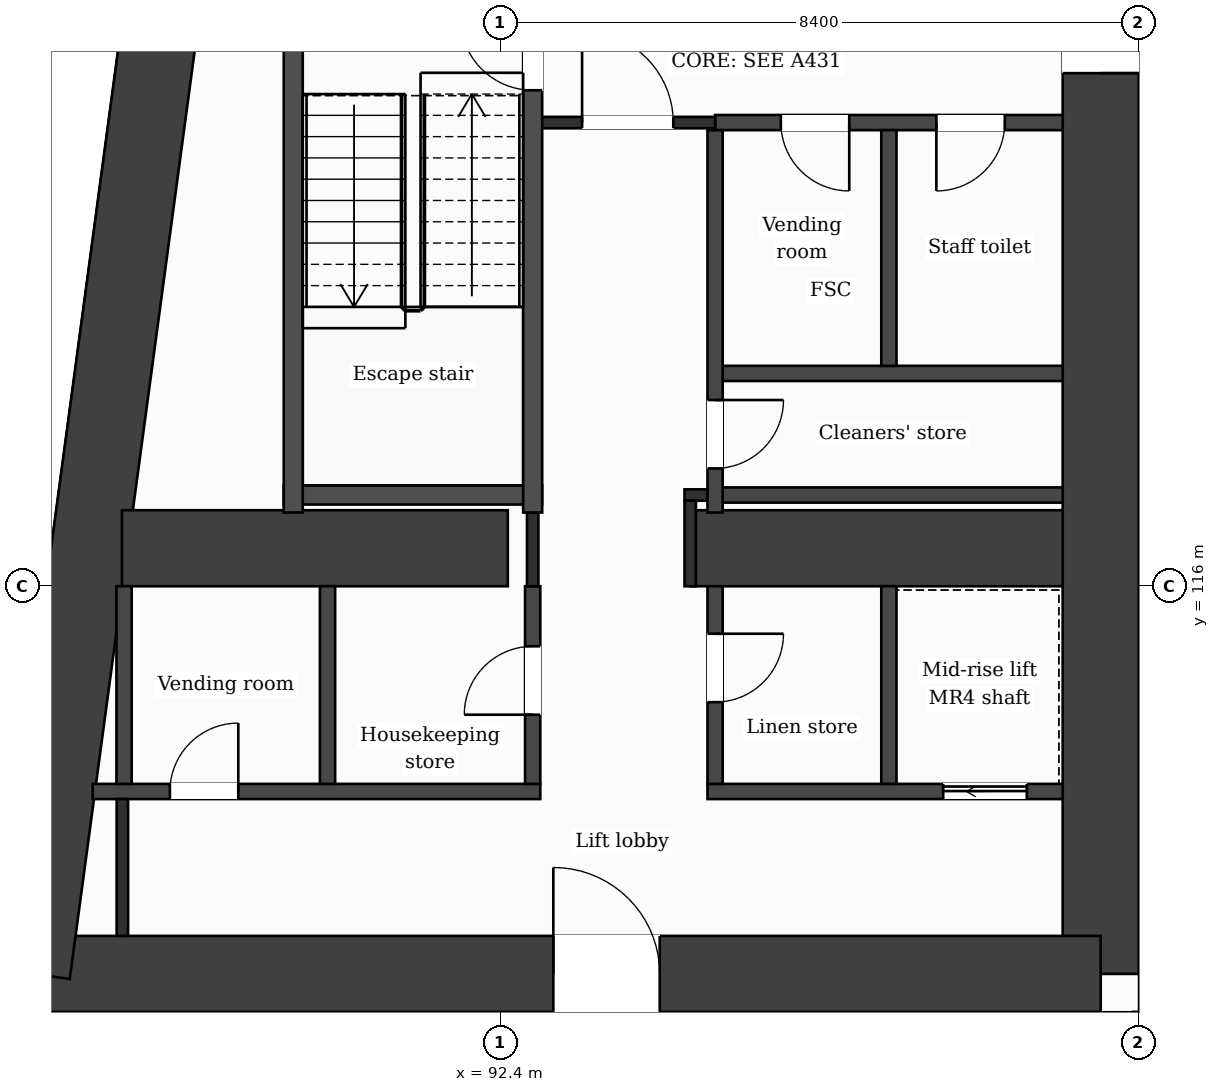
"""IFC4 building model, lengths in metres.
Left out: names, types, materials, properties, quantities, classifications, styles, units other than length and angle.
Written with IfcOpenShell. Run it as: python <this file> out.ifc"""

import sys

from ifc_helpers import new_model, si_unit, direction, frame, frame_2d, origin, place, context, subcontext, project, spatial, rectangle, extrude, element, fill, save


model = new_model("IFC4")
c1 = context("Model", 3, precision=1e-05, world=origin(), true_north=direction((0.0, 1.0)))
c2 = subcontext(c1, "Body", "Model", "MODEL_VIEW")
j1 = project(units=[si_unit("LENGTHUNIT", "METRE"), si_unit("PLANEANGLEUNIT", "RADIAN")], contexts=[c1])
p1 = place(None, origin())
s1 = spatial("IfcSite", under=j1, at=p1, CompositionType="ELEMENT")
p2 = place(p1, origin())
s2 = spatial("IfcBuilding", under=s1, at=p2, CompositionType="ELEMENT")
p3 = place(p2, frame((0.0, 0.0, 128.0)))
s3 = spatial("IfcBuildingStorey", under=s2, at=p3, CompositionType="ELEMENT", Elevation=128.0)
p4 = place(p3, frame((100.3, 131.9, 0.0), z_axis=(0.0, 0.0, 1.0), x_axis=(0.0, -1.0, 0.0)))
e1 = element("IfcWall", 1, at=p4, inside=s3, PredefinedType="SHEAR", context=c2, shape_type="SweptSolid", body=[
    extrude(rectangle(XDim=21.0, YDim=1.0, at=frame_2d((10.5, 0.0))), origin(), (0.0, 0.0, 1.0), 3.7),
])
p5 = place(p4, frame((7.75, 0.0, 0.0)))
e2 = element("IfcOpeningElement", 2, at=p5, cuts=e1, PredefinedType="OPENING", context=c2, shape_type="SweptSolid", body=[
    extrude(rectangle(XDim=1.4, YDim=2.1, at=frame_2d((0.7, 1.05))), frame((0.0, 0.51, 0.0), z_axis=(0.0, -1.0, 0.0), x_axis=(1.0, 0.0, 0.0)), (0.0, 0.0, 1.0), 1.02),
])
p6 = place(p3, frame((100.3, 110.9, 0.0), z_axis=(0.0, 0.0, 1.0), x_axis=(-1.0, 0.0, 0.0)))
e3 = element("IfcWall", 3, at=p6, inside=s3, PredefinedType="SHEAR", context=c2, shape_type="SweptSolid", body=[
    extrude(rectangle(XDim=14.059, YDim=1.0, at=frame_2d((7.03, 0.0))), origin(), (0.0, 0.0, 1.0), 3.7),
])
p7 = place(p6, frame((5.802, 0.0, 0.0)))
e4 = element("IfcOpeningElement", 4, at=p7, cuts=e3, PredefinedType="OPENING", context=c2, shape_type="SweptSolid", body=[
    extrude(rectangle(XDim=1.4, YDim=2.1, at=frame_2d((0.7, 1.05))), frame((0.0, 0.51, 0.0), z_axis=(0.0, -1.0, 0.0), x_axis=(1.0, 0.0, 0.0)), (0.0, 0.0, 1.0), 1.02),
])
p8 = place(p3, frame((86.241, 110.9, 0.0), z_axis=(0.0, 0.0, 1.0), x_axis=(0.133411141623, 0.991060778808, 0.0)))
e5 = element("IfcWall", 5, at=p8, inside=s3, PredefinedType="SHEAR", context=c2, shape_type="SweptSolid", body=[
    extrude(rectangle(XDim=21.189, YDim=1.0, at=frame_2d((10.595, 0.0))), origin(), (0.0, 0.0, 1.0), 3.7),
])
p9 = place(p3, frame((87.423, 116.5, 0.0), z_axis=(0.0, 0.0, 1.0), x_axis=(1.0, 0.0, 0.0)))
e6 = element("IfcWall", 6, at=p9, inside=s3, PredefinedType="SHEAR", context=c2, shape_type="SweptSolid", body=[
    extrude(rectangle(XDim=5.077, YDim=1.0, at=frame_2d((2.539, 0.0))), origin(), (0.0, 0.0, 1.0), 3.7),
])
p10 = place(p3, frame((94.9, 116.5, 0.0), z_axis=(0.0, 0.0, 1.0), x_axis=(1.0, 0.0, 0.0)))
e7 = element("IfcWall", 7, at=p10, inside=s3, PredefinedType="SHEAR", context=c2, shape_type="SweptSolid", body=[
    extrude(rectangle(XDim=4.9, YDim=1.0, at=frame_2d((2.45, 0.0))), origin(), (0.0, 0.0, 1.0), 3.7),
])
p11 = place(p3, frame((87.334, 110.4, 0.0), z_axis=(0.0, 0.0, 1.0), x_axis=(-0.133437175554, -0.991057273915, 0.0)))
e8 = element("IfcWall", 8, at=p11, inside=s3, PredefinedType="SOLIDWALL", context=c2, shape_type="SweptSolid", body=[
    extrude(rectangle(XDim=6.781, YDim=0.3, at=frame_2d((3.39, 0.0))), origin(), (0.0, 0.0, 1.0), 3.38),
])
p12 = place(p11, frame((1.418, 0.0, 0.0)))
e9 = element("IfcOpeningElement", 9, at=p12, cuts=e8, PredefinedType="OPENING", context=c2, shape_type="SweptSolid", body=[
    extrude(rectangle(XDim=1.2, YDim=2.4, at=frame_2d((0.6, 1.2))), frame((0.0, 0.16, 0.0), z_axis=(0.0, -1.0, 0.0), x_axis=(1.0, 0.0, 0.0)), (0.0, 0.0, 1.0), 0.32),
])
p13 = place(p11, frame((4.758, 0.0, 0.9)))
e10 = element("IfcOpeningElement", 10, at=p13, cuts=e8, PredefinedType="OPENING", context=c2, shape_type="SweptSolid", body=[
    extrude(rectangle(XDim=1.2, YDim=2.1, at=frame_2d((0.6, 1.05))), frame((0.0, 0.16, 0.0), z_axis=(0.0, -1.0, 0.0), x_axis=(1.0, 0.0, 0.0)), (0.0, 0.0, 1.0), 0.32),
])
p14 = place(p3, frame((87.039, 113.3, 0.0), z_axis=(0.0, 0.0, 1.0), x_axis=(1.0, 0.0, 0.0)))
e11 = element("IfcWall", 11, at=p14, inside=s3, PredefinedType="PARTITIONING", context=c2, shape_type="SweptSolid", body=[
    extrude(rectangle(XDim=5.888, YDim=0.2, at=frame_2d((2.944, 0.0))), origin(), (0.0, 0.0, 1.0), 3.38),
])
p15 = place(p14, frame((1.015, 0.0, 0.0)))
e12 = element("IfcOpeningElement", 12, at=p15, cuts=e11, PredefinedType="OPENING", context=c2, shape_type="SweptSolid", body=[
    extrude(rectangle(XDim=0.9, YDim=2.1, at=frame_2d((0.45, 1.05))), frame((0.0, 0.11, 0.0), z_axis=(0.0, -1.0, 0.0), x_axis=(1.0, 0.0, 0.0)), (0.0, 0.0, 1.0), 0.22),
])
p16 = place(p3, frame((95.127, 113.3, 0.0), z_axis=(0.0, 0.0, 1.0), x_axis=(1.0, 0.0, 0.0)))
e13 = element("IfcWall", 13, at=p16, inside=s3, PredefinedType="PARTITIONING", context=c2, shape_type="SweptSolid", body=[
    extrude(rectangle(XDim=4.673, YDim=0.2, at=frame_2d((2.336, 0.0))), origin(), (0.0, 0.0, 1.0), 3.38),
])
p17 = place(p16, frame((3.101, 0.0, 0.0)))
e14 = element("IfcOpeningElement", 14, at=p17, cuts=e13, PredefinedType="OPENING", context=c2, shape_type="SweptSolid", body=[
    extrude(rectangle(XDim=1.1, YDim=2.1, at=frame_2d((0.55, 1.05))), frame((0.0, 0.11, 0.0), z_axis=(0.0, -1.0, 0.0), x_axis=(1.0, 0.0, 0.0)), (0.0, 0.0, 1.0), 0.22),
])
p18 = place(p3, frame((95.227, 117.2, 0.0), z_axis=(0.0, 0.0, 1.0), x_axis=(1.0, 0.0, 0.0)))
e15 = element("IfcWall", 15, at=p18, inside=s3, PredefinedType="PARTITIONING", context=c2, shape_type="SweptSolid", body=[
    extrude(rectangle(XDim=4.573, YDim=0.2, at=frame_2d((2.287, 0.0))), origin(), (0.0, 0.0, 1.0), 3.38),
])
p19 = place(p3, frame((94.825, 117.2, 0.0), z_axis=(0.0, 0.0, 1.0), x_axis=(1.0, 0.0, 0.0)))
e16 = element("IfcWall", 16, at=p19, inside=s3, PredefinedType="PARTITIONING", context=c2, shape_type="SweptSolid", body=[
    extrude(rectangle(XDim=0.402, YDim=0.15, at=frame_2d((0.201, 0.0))), origin(), (0.0, 0.0, 1.0), 3.38),
])
p20 = place(p3, frame((89.552, 117.2, 0.0), z_axis=(0.0, 0.0, 1.0), x_axis=(1.0, 0.0, 0.0)))
e17 = element("IfcWall", 17, at=p20, inside=s3, PredefinedType="PARTITIONING", context=c2, shape_type="SweptSolid", body=[
    extrude(rectangle(XDim=3.4, YDim=0.25, at=frame_2d((1.7, 0.0))), origin(), (0.0, 0.0, 1.0), 3.38),
])
p21 = place(p3, frame((95.227, 118.8, 0.0), z_axis=(0.0, 0.0, 1.0), x_axis=(1.0, 0.0, 0.0)))
e18 = element("IfcWall", 18, at=p21, inside=s3, PredefinedType="PARTITIONING", context=c2, shape_type="SweptSolid", body=[
    extrude(rectangle(XDim=4.573, YDim=0.2, at=frame_2d((2.287, 0.0))), origin(), (0.0, 0.0, 1.0), 3.38),
])
p22 = place(p3, frame((95.227, 122.1, 0.0), z_axis=(0.0, 0.0, 1.0), x_axis=(1.0, 0.0, 0.0)))
e19 = element("IfcWall", 19, at=p22, inside=s3, PredefinedType="PARTITIONING", context=c2, shape_type="SweptSolid", body=[
    extrude(rectangle(XDim=4.573, YDim=0.2, at=frame_2d((2.287, 0.0))), origin(), (0.0, 0.0, 1.0), 3.38),
])
p23 = place(p22, frame((0.865, 0.0, 0.0)))
e20 = element("IfcOpeningElement", 20, at=p23, cuts=e19, PredefinedType="OPENING", context=c2, shape_type="SweptSolid", body=[
    extrude(rectangle(XDim=0.9, YDim=2.1, at=frame_2d((0.45, 1.05))), frame((0.0, 0.11, 0.0), z_axis=(0.0, -1.0, 0.0), x_axis=(1.0, 0.0, 0.0)), (0.0, 0.0, 1.0), 0.22),
])
p24 = place(p22, frame((2.911, 0.0, 0.0)))
e21 = element("IfcOpeningElement", 21, at=p24, cuts=e19, PredefinedType="OPENING", context=c2, shape_type="SweptSolid", body=[
    extrude(rectangle(XDim=0.9, YDim=2.1, at=frame_2d((0.45, 1.05))), frame((0.0, 0.11, 0.0), z_axis=(0.0, -1.0, 0.0), x_axis=(1.0, 0.0, 0.0)), (0.0, 0.0, 1.0), 0.22),
])
p25 = place(p3, frame((92.827, 122.1, 0.0), z_axis=(0.0, 0.0, 1.0), x_axis=(1.0, 0.0, 0.0)))
e22 = element("IfcWall", 22, at=p25, inside=s3, PredefinedType="PARTITIONING", context=c2, shape_type="SweptSolid", body=[
    extrude(rectangle(XDim=2.4, YDim=0.15, at=frame_2d((1.2, 0.0))), origin(), (0.0, 0.0, 1.0), 3.38),
])
p26 = place(p25, frame((0.65, 0.0, 0.0)))
e23 = element("IfcOpeningElement", 23, at=p26, cuts=e22, PredefinedType="OPENING", context=c2, shape_type="SweptSolid", body=[
    extrude(rectangle(XDim=1.2, YDim=2.1, at=frame_2d((0.6, 1.05))), frame((0.0, 0.085, 0.0), z_axis=(0.0, -1.0, 0.0), x_axis=(1.0, 0.0, 0.0)), (0.0, 0.0, 1.0), 0.17),
])
p27 = place(p3, frame((87.451, 113.4, 0.0), z_axis=(0.0, 0.0, 1.0), x_axis=(0.0, 1.0, 0.0)))
e24 = element("IfcWall", 24, at=p27, inside=s3, PredefinedType="PARTITIONING", context=c2, shape_type="SweptSolid", body=[
    extrude(rectangle(XDim=2.6, YDim=0.2, at=frame_2d((1.3, 0.0))), origin(), (0.0, 0.0, 1.0), 3.38),
])
p28 = place(p3, frame((87.429, 111.4, 0.0), z_axis=(0.0, 0.0, 1.0), x_axis=(0.0, 1.0, 0.0)))
e25 = element("IfcWall", 25, at=p28, inside=s3, PredefinedType="PARTITIONING", context=c2, shape_type="SweptSolid", body=[
    extrude(rectangle(XDim=1.8, YDim=0.15, at=frame_2d((0.9, 0.0))), origin(), (0.0, 0.0, 1.0), 3.38),
])
p29 = place(p3, frame((89.677, 116.97, 0.0), z_axis=(0.0, 0.0, 1.0), x_axis=(0.0, 1.0, 0.0)))
e26 = element("IfcWall", 26, at=p29, inside=s3, PredefinedType="PARTITIONING", context=c2, shape_type="SweptSolid", body=[
    extrude(rectangle(XDim=6.855, YDim=0.25, at=frame_2d((3.427, 0.0))), origin(), (0.0, 0.0, 1.0), 3.38),
])
p30 = place(p3, frame((90.128, 113.4, 0.0), z_axis=(0.0, 0.0, 1.0), x_axis=(0.0, 1.0, 0.0)))
e27 = element("IfcWall", 27, at=p30, inside=s3, PredefinedType="PARTITIONING", context=c2, shape_type="SweptSolid", body=[
    extrude(rectangle(XDim=2.6, YDim=0.2, at=frame_2d((1.3, 0.0))), origin(), (0.0, 0.0, 1.0), 3.38),
])
p31 = place(p3, frame((92.827, 113.4, 0.0), z_axis=(0.0, 0.0, 1.0), x_axis=(0.0, 1.0, 0.0)))
e28 = element("IfcWall", 28, at=p31, inside=s3, PredefinedType="PARTITIONING", context=c2, shape_type="SweptSolid", body=[
    extrude(rectangle(XDim=2.6, YDim=0.2, at=frame_2d((1.3, 0.0))), origin(), (0.0, 0.0, 1.0), 3.38),
])
p32 = place(p31, frame((0.91, 0.0, 0.0)))
e29 = element("IfcOpeningElement", 29, at=p32, cuts=e28, PredefinedType="OPENING", context=c2, shape_type="SweptSolid", body=[
    extrude(rectangle(XDim=0.9, YDim=2.1, at=frame_2d((0.45, 1.05))), frame((0.0, 0.11, 0.0), z_axis=(0.0, -1.0, 0.0), x_axis=(1.0, 0.0, 0.0)), (0.0, 0.0, 1.0), 0.22),
])
p33 = place(p3, frame((92.827, 116.0, 0.0), z_axis=(0.0, 0.0, 1.0), x_axis=(0.0, 1.0, 0.0)))
e30 = element("IfcWall", 30, at=p33, inside=s3, PredefinedType="PARTITIONING", context=c2, shape_type="SweptSolid", body=[
    extrude(rectangle(XDim=0.97, YDim=0.15, at=frame_2d((0.485, 0.0))), origin(), (0.0, 0.0, 1.0), 3.38),
])
p34 = place(p3, frame((92.827, 116.97, 0.0), z_axis=(0.0, 0.0, 1.0), x_axis=(0.0, 1.0, 0.0)))
e31 = element("IfcWall", 31, at=p34, inside=s3, PredefinedType="PARTITIONING", context=c2, shape_type="SweptSolid", body=[
    extrude(rectangle(XDim=6.855, YDim=0.25, at=frame_2d((3.427, 0.0))), origin(), (0.0, 0.0, 1.0), 3.38),
])
p35 = place(p34, frame((5.555, 0.0, 0.0)))
e32 = element("IfcOpeningElement", 32, at=p35, cuts=e31, PredefinedType="OPENING", context=c2, shape_type="SweptSolid", body=[
    extrude(rectangle(XDim=0.95, YDim=2.1, at=frame_2d((0.475, 1.05))), frame((0.0, 0.135, 0.0), z_axis=(0.0, -1.0, 0.0), x_axis=(1.0, 0.0, 0.0)), (0.0, 0.0, 1.0), 0.27),
])
p36 = place(p3, frame((94.9, 116.0, 0.0), z_axis=(0.0, 0.0, 1.0), x_axis=(0.0, 1.0, 0.0)))
e33 = element("IfcWall", 33, at=p36, inside=s3, PredefinedType="PARTITIONING", context=c2, shape_type="SweptSolid", body=[
    extrude(rectangle(XDim=1.125, YDim=0.15, at=frame_2d((0.562, 0.0))), origin(), (0.0, 0.0, 1.0), 3.38),
])
p37 = place(p3, frame((95.227, 113.4, 0.0), z_axis=(0.0, 0.0, 1.0), x_axis=(0.0, 1.0, 0.0)))
e34 = element("IfcWall", 34, at=p37, inside=s3, PredefinedType="PARTITIONING", context=c2, shape_type="SweptSolid", body=[
    extrude(rectangle(XDim=2.6, YDim=0.2, at=frame_2d((1.3, 0.0))), origin(), (0.0, 0.0, 1.0), 3.38),
])
p38 = place(p37, frame((1.075, 0.0, 0.0)))
e35 = element("IfcOpeningElement", 35, at=p38, cuts=e34, PredefinedType="OPENING", context=c2, shape_type="SweptSolid", body=[
    extrude(rectangle(XDim=0.9, YDim=2.1, at=frame_2d((0.45, 1.05))), frame((0.0, 0.11, 0.0), z_axis=(0.0, -1.0, 0.0), x_axis=(1.0, 0.0, 0.0)), (0.0, 0.0, 1.0), 0.22),
])
p39 = place(p3, frame((95.227, 116.97, 0.0), z_axis=(0.0, 0.0, 1.0), x_axis=(0.0, 1.0, 0.0)))
e36 = element("IfcWall", 36, at=p39, inside=s3, PredefinedType="PARTITIONING", context=c2, shape_type="SweptSolid", body=[
    extrude(rectangle(XDim=5.03, YDim=0.2, at=frame_2d((2.515, 0.0))), origin(), (0.0, 0.0, 1.0), 3.38),
])
p40 = place(p39, frame((0.58, 0.0, 0.0)))
e37 = element("IfcOpeningElement", 37, at=p40, cuts=e36, PredefinedType="OPENING", context=c2, shape_type="SweptSolid", body=[
    extrude(rectangle(XDim=0.9, YDim=2.1, at=frame_2d((0.45, 1.05))), frame((0.0, 0.11, 0.0), z_axis=(0.0, -1.0, 0.0), x_axis=(1.0, 0.0, 0.0)), (0.0, 0.0, 1.0), 0.22),
])
p41 = place(p3, frame((97.513, 113.4, 0.0), z_axis=(0.0, 0.0, 1.0), x_axis=(0.0, 1.0, 0.0)))
e38 = element("IfcWall", 38, at=p41, inside=s3, PredefinedType="PARTITIONING", context=c2, shape_type="SweptSolid", body=[
    extrude(rectangle(XDim=2.6, YDim=0.2, at=frame_2d((1.3, 0.0))), origin(), (0.0, 0.0, 1.0), 3.38),
])
p42 = place(p3, frame((97.513, 118.9, 0.0), z_axis=(0.0, 0.0, 1.0), x_axis=(0.0, 1.0, 0.0)))
e39 = element("IfcWall", 39, at=p42, inside=s3, PredefinedType="PARTITIONING", context=c2, shape_type="SweptSolid", body=[
    extrude(rectangle(XDim=3.1, YDim=0.2, at=frame_2d((1.55, 0.0))), origin(), (0.0, 0.0, 1.0), 3.38),
])
p43 = place(p3, frame((100.8, 109.075, 0.0), z_axis=(0.0, 0.0, 1.0), x_axis=(0.0, 1.0, 0.0)))
e40 = element("IfcWall", 40, at=p43, inside=s3, PredefinedType="PARTITIONING", context=c2, shape_type="SweptSolid", body=[
    extrude(rectangle(XDim=1.325, YDim=0.15, at=frame_2d((0.663, 0.0))), origin(), (0.0, 0.0, 1.0), 3.38),
])
p44 = place(p26, origin())
e41 = element("IfcDoor", 41, at=p44, inside=s3, OperationType="SINGLE_SWING_LEFT", PredefinedType="DOOR", context=c2, shape_type="SweptSolid", body=[
    extrude(rectangle(XDim=1.2, YDim=2.1, at=frame_2d((0.6, 1.05))), frame((0.0, 0.025, 0.0), z_axis=(0.0, -1.0, 0.0), x_axis=(1.0, 0.0, 0.0)), (0.0, 0.0, 1.0), 0.05),
])
fill(e23, e41)
p45 = place(p23, origin())
e42 = element("IfcDoor", 42, at=p45, inside=s3, OperationType="SINGLE_SWING_RIGHT", PredefinedType="DOOR", context=c2, shape_type="SweptSolid", body=[
    extrude(rectangle(XDim=0.9, YDim=2.1, at=frame_2d((0.45, 1.05))), frame((0.0, 0.025, 0.0), z_axis=(0.0, -1.0, 0.0), x_axis=(1.0, 0.0, 0.0)), (0.0, 0.0, 1.0), 0.05),
])
fill(e20, e42)
p46 = place(p24, origin())
e43 = element("IfcDoor", 43, at=p46, inside=s3, OperationType="SINGLE_SWING_LEFT", PredefinedType="DOOR", context=c2, shape_type="SweptSolid", body=[
    extrude(rectangle(XDim=0.9, YDim=2.1, at=frame_2d((0.45, 1.05))), frame((0.0, 0.025, 0.0), z_axis=(0.0, -1.0, 0.0), x_axis=(1.0, 0.0, 0.0)), (0.0, 0.0, 1.0), 0.05),
])
fill(e21, e43)
p47 = place(p35, origin())
e44 = element("IfcDoor", 44, at=p47, inside=s3, OperationType="SINGLE_SWING_RIGHT", PredefinedType="DOOR", context=c2, shape_type="SweptSolid", body=[
    extrude(rectangle(XDim=0.95, YDim=2.1, at=frame_2d((0.475, 1.05))), frame((0.0, 0.025, 0.0), z_axis=(0.0, -1.0, 0.0), x_axis=(1.0, 0.0, 0.0)), (0.0, 0.0, 1.0), 0.05),
])
fill(e32, e44)
p48 = place(p40, origin())
e45 = element("IfcDoor", 45, at=p48, inside=s3, OperationType="SINGLE_SWING_RIGHT", PredefinedType="DOOR", context=c2, shape_type="SweptSolid", body=[
    extrude(rectangle(XDim=0.9, YDim=2.1, at=frame_2d((0.45, 1.05))), frame((0.0, 0.025, 0.0), z_axis=(0.0, -1.0, 0.0), x_axis=(1.0, 0.0, 0.0)), (0.0, 0.0, 1.0), 0.05),
])
fill(e37, e45)
p49 = place(p17, origin())
e46 = element("IfcDoor", 46, at=p49, inside=s3, OperationType="SLIDING_TO_LEFT", PredefinedType="DOOR", context=c2, shape_type="SweptSolid", body=[
    extrude(rectangle(XDim=1.1, YDim=2.1, at=frame_2d((0.55, 1.05))), frame((0.0, 0.025, 0.0), z_axis=(0.0, -1.0, 0.0), x_axis=(1.0, 0.0, 0.0)), (0.0, 0.0, 1.0), 0.05),
])
fill(e14, e46)
p50 = place(p15, origin())
e47 = element("IfcDoor", 47, at=p50, inside=s3, OperationType="SINGLE_SWING_RIGHT", PredefinedType="DOOR", context=c2, shape_type="SweptSolid", body=[
    extrude(rectangle(XDim=0.9, YDim=2.1, at=frame_2d((0.45, 1.05))), frame((0.0, 0.025, 0.0), z_axis=(0.0, -1.0, 0.0), x_axis=(1.0, 0.0, 0.0)), (0.0, 0.0, 1.0), 0.05),
])
fill(e12, e47)
p51 = place(p32, origin())
e48 = element("IfcDoor", 48, at=p51, inside=s3, OperationType="SINGLE_SWING_LEFT", PredefinedType="DOOR", context=c2, shape_type="SweptSolid", body=[
    extrude(rectangle(XDim=0.9, YDim=2.1, at=frame_2d((0.45, 1.05))), frame((0.0, 0.025, 0.0), z_axis=(0.0, -1.0, 0.0), x_axis=(1.0, 0.0, 0.0)), (0.0, 0.0, 1.0), 0.05),
])
fill(e29, e48)
p52 = place(p38, origin())
e49 = element("IfcDoor", 49, at=p52, inside=s3, OperationType="SINGLE_SWING_RIGHT", PredefinedType="DOOR", context=c2, shape_type="SweptSolid", body=[
    extrude(rectangle(XDim=0.9, YDim=2.1, at=frame_2d((0.45, 1.05))), frame((0.0, 0.025, 0.0), z_axis=(0.0, -1.0, 0.0), x_axis=(1.0, 0.0, 0.0)), (0.0, 0.0, 1.0), 0.05),
])
fill(e35, e49)
p53 = place(p7, origin())
e50 = element("IfcDoor", 50, at=p53, inside=s3, OperationType="SINGLE_SWING_RIGHT", PredefinedType="DOOR", context=c2, shape_type="SweptSolid", body=[
    extrude(rectangle(XDim=1.4, YDim=2.1, at=frame_2d((0.7, 1.05))), frame((0.0, 0.025, 0.0), z_axis=(0.0, -1.0, 0.0), x_axis=(1.0, 0.0, 0.0)), (0.0, 0.0, 1.0), 0.05),
])
fill(e4, e50)
p54 = place(p5, origin())
e51 = element("IfcDoor", 51, at=p54, inside=s3, OperationType="SINGLE_SWING_RIGHT", PredefinedType="DOOR", context=c2, shape_type="SweptSolid", body=[
    extrude(rectangle(XDim=1.4, YDim=2.1, at=frame_2d((0.7, 1.05))), frame((0.0, 0.025, 0.0), z_axis=(0.0, -1.0, 0.0), x_axis=(1.0, 0.0, 0.0)), (0.0, 0.0, 1.0), 0.05),
])
fill(e2, e51)
save(model, sys.argv[1])
